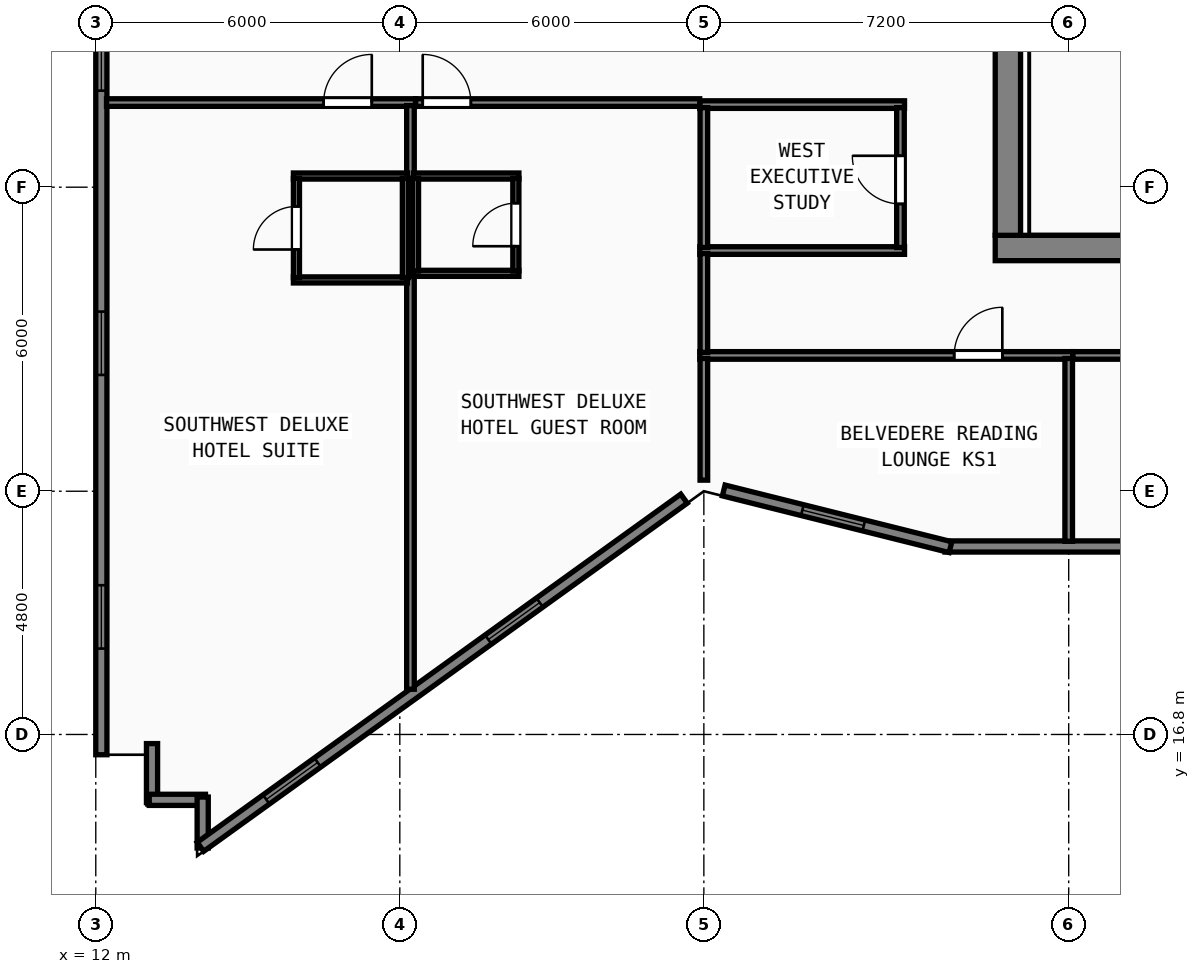
"""IFC4 building model, lengths in metres.
Left out: names, types, materials, properties, quantities, classifications, styles, units other than length and angle.
Written with IfcOpenShell. Run it as: python <this file> out.ifc"""

import sys

from ifc_helpers import new_model, si_unit, direction, frame, frame_2d, origin, origin_2d, place, context, subcontext, project, spatial, rectangle, hollow_rectangle, extrude, element, fill, save


model = new_model("IFC4")
c1 = context("Model", 3, precision=1e-05, world=origin(), true_north=direction((0.0, 1.0)))
c2 = subcontext(c1, "Body", "Model", "MODEL_VIEW")
j1 = project(units=[si_unit("LENGTHUNIT", "METRE"), si_unit("PLANEANGLEUNIT", "RADIAN")], contexts=[c1])
p1 = place(None, origin())
s1 = spatial("IfcSite", under=j1, at=p1, CompositionType="ELEMENT")
p2 = place(p1, origin())
s2 = spatial("IfcBuilding", under=s1, at=p2, CompositionType="ELEMENT")
p3 = place(p2, frame((0.0, 0.0, 235.2)))
s3 = spatial("IfcBuildingStorey", under=s2, at=p3, CompositionType="ELEMENT", Elevation=235.2)
p4 = place(p3, frame((29.75, 26.4, 0.0), z_axis=(0.0, 0.0, 1.0), x_axis=(1.0, 0.0, 0.0)))
e1 = element("IfcWall", 1, at=p4, inside=s3, PredefinedType="SHEAR", context=c2, shape_type="SweptSolid", body=[
    extrude(rectangle(XDim=17.3, YDim=0.5, at=frame_2d((8.65, 0.0))), origin(), (0.0, 0.0, 1.0), 3.67),
])
p5 = place(p4, frame((11.2, 0.0, 0.0), z_axis=(0.0, 0.0, 1.0), x_axis=(-1.0, 0.0, 0.0)))
e2 = element("IfcOpeningElement", 2, at=p5, cuts=e1, PredefinedType="OPENING", context=c2, shape_type="SweptSolid", body=[
    extrude(rectangle(XDim=0.9, YDim=2.1, at=frame_2d((0.45, 1.05))), frame((0.0, 0.26, 0.0), z_axis=(0.0, -1.0, 0.0), x_axis=(1.0, 0.0, 0.0)), (0.0, 0.0, 1.0), 0.52),
])
p6 = place(p3, frame((30.0, 26.65, 0.0), z_axis=(0.0, 0.0, 1.0), x_axis=(0.0, 1.0, 0.0)))
e3 = element("IfcWall", 3, at=p6, inside=s3, PredefinedType="SHEAR", context=c2, shape_type="SweptSolid", body=[
    extrude(rectangle(XDim=4.2, YDim=0.5, at=frame_2d((2.1, 0.0))), origin(), (0.0, 0.0, 1.0), 3.67),
])
for number, where, z_axis, x_axis in (
    (4, (24.0, 21.6, 0.0), (0.0, 0.0, 1.0), (1.0, 0.0, 0.0)),
    (5, (31.2, 21.6, 0.0), (0.0, 0.0, 1.0), (1.0, 0.0, 0.0)),
    (6, (12.6, 16.8, 0.0), (0.0, 0.0, 1.0), (1.0, 0.0, 0.0)),
    (7, (12.6, 27.6, 0.0), (0.0, 0.0, 1.0), (1.0, 0.0, 0.0)),
):
    element("IfcColumn", number, at=place(p3, frame(where, z_axis=z_axis, x_axis=x_axis)), inside=s3, PredefinedType="COLUMN", context=c2, shape_type="SweptSolid", body=[
        extrude(hollow_rectangle(XDim=0.8, YDim=0.8, WallThickness=0.03, at=origin_2d()), origin(), (0.0, 0.0, 1.0), 3.85),
    ])
for number, where, z_axis, x_axis in (
    (8, (24.0, 27.6, 0.0), (0.0, 0.0, 1.0), (1.0, 0.0, 0.0)),
    (9, (18.3, 19.2, 0.0), (0.0, 0.0, 1.0), (1.0, 0.0, 0.0)),
):
    element("IfcColumn", number, at=place(p3, frame(where, z_axis=z_axis, x_axis=x_axis)), inside=s3, PredefinedType="COLUMN", context=c2, shape_type="SweptSolid", body=[
        extrude(hollow_rectangle(XDim=0.7, YDim=0.7, WallThickness=0.026, at=origin_2d()), origin(), (0.0, 0.0, 1.0), 3.85),
    ])
p7 = place(p3, frame((28.759, 20.51, 0.0), z_axis=(0.0, 0.0, 1.0), x_axis=(1.0, 0.0, 0.0)))
e10 = element("IfcWall", 10, at=p7, inside=s3, PredefinedType="SOLIDWALL", context=c2, shape_type="SweptSolid", body=[
    extrude(rectangle(XDim=19.283, YDim=0.22, at=frame_2d((9.642, 0.0))), origin(), (0.0, 0.0, 1.0), 3.67),
])
p8 = place(p7, frame((15.641, 0.0, 0.0), z_axis=(0.0, 0.0, 1.0), x_axis=(-1.0, 0.0, 0.0)))
e11 = element("IfcOpeningElement", 11, at=p8, cuts=e10, PredefinedType="OPENING", context=c2, shape_type="SweptSolid", body=[
    extrude(rectangle(XDim=1.2, YDim=2.15, at=frame_2d((0.6, 1.075))), frame((0.0, 0.12, 0.0), z_axis=(0.0, -1.0, 0.0), x_axis=(1.0, 0.0, 0.0)), (0.0, 0.0, 1.0), 0.24),
])
p9 = place(p3, frame((12.11, 37.545, 0.0), z_axis=(0.0, 0.0, 1.0), x_axis=(0.0, -1.0, 0.0)))
e12 = element("IfcWall", 12, at=p9, inside=s3, PredefinedType="SOLIDWALL", context=c2, shape_type="SweptSolid", body=[
    extrude(rectangle(XDim=21.145, YDim=0.22, at=frame_2d((10.573, 0.0))), origin(), (0.0, 0.0, 1.0), 3.67),
])
p10 = place(p9, frame((1.6, 0.0, 0.85)))
e13 = element("IfcOpeningElement", 13, at=p10, cuts=e12, PredefinedType="OPENING", context=c2, shape_type="SweptSolid", body=[
    extrude(rectangle(XDim=1.25, YDim=1.95, at=frame_2d((0.625, 0.975))), frame((0.0, 0.12, 0.0), z_axis=(0.0, -1.0, 0.0), x_axis=(1.0, 0.0, 0.0)), (0.0, 0.0, 1.0), 0.24),
])
p11 = place(p9, frame((6.79, 0.0, 0.85)))
e14 = element("IfcOpeningElement", 14, at=p11, cuts=e12, PredefinedType="OPENING", context=c2, shape_type="SweptSolid", body=[
    extrude(rectangle(XDim=1.25, YDim=1.95, at=frame_2d((0.625, 0.975))), frame((0.0, 0.12, 0.0), z_axis=(0.0, -1.0, 0.0), x_axis=(1.0, 0.0, 0.0)), (0.0, 0.0, 1.0), 0.24),
])
p12 = place(p9, frame((12.4, 0.0, 0.85)))
e15 = element("IfcOpeningElement", 15, at=p12, cuts=e12, PredefinedType="OPENING", context=c2, shape_type="SweptSolid", body=[
    extrude(rectangle(XDim=1.25, YDim=1.95, at=frame_2d((0.625, 0.975))), frame((0.0, 0.12, 0.0), z_axis=(0.0, -1.0, 0.0), x_axis=(1.0, 0.0, 0.0)), (0.0, 0.0, 1.0), 0.24),
])
p13 = place(p9, frame((17.8, 0.0, 0.85)))
e16 = element("IfcOpeningElement", 16, at=p13, cuts=e12, PredefinedType="OPENING", context=c2, shape_type="SweptSolid", body=[
    extrude(rectangle(XDim=1.25, YDim=1.95, at=frame_2d((0.625, 0.975))), frame((0.0, 0.12, 0.0), z_axis=(0.0, -1.0, 0.0), x_axis=(1.0, 0.0, 0.0)), (0.0, 0.0, 1.0), 0.24),
])
p14 = place(p3, frame((13.11, 16.62, 0.0), z_axis=(0.0, 0.0, 1.0), x_axis=(0.0, -1.0, 0.0)))
e17 = element("IfcWall", 17, at=p14, inside=s3, PredefinedType="SOLIDWALL", context=c2, shape_type="SweptSolid", body=[
    extrude(rectangle(XDim=1.165, YDim=0.22, at=frame_2d((0.583, 0.0))), origin(), (0.0, 0.0, 1.0), 3.67),
])
p15 = place(p3, frame((13.055, 15.51, 0.0), z_axis=(0.0, 0.0, 1.0), x_axis=(1.0, 0.0, 0.0)))
e18 = element("IfcWall", 18, at=p15, inside=s3, PredefinedType="SOLIDWALL", context=c2, shape_type="SweptSolid", body=[
    extrude(rectangle(XDim=1.11, YDim=0.22, at=frame_2d((0.555, 0.0))), origin(), (0.0, 0.0, 1.0), 3.67),
])
p16 = place(p3, frame((14.11, 15.565, 0.0), z_axis=(0.0, 0.0, 1.0), x_axis=(0.0, -1.0, 0.0)))
e19 = element("IfcWall", 19, at=p16, inside=s3, PredefinedType="SOLIDWALL", context=c2, shape_type="SweptSolid", body=[
    extrude(rectangle(XDim=1.005, YDim=0.22, at=frame_2d((0.502, 0.0))), origin(), (0.0, 0.0, 1.0), 3.67),
])
p17 = place(p3, frame((14.065, 14.583, 0.0), z_axis=(0.0, 0.0, 1.0), x_axis=(0.811523708458, 0.584319493608, 0.0)))
e20 = element("IfcWall", 20, at=p17, inside=s3, PredefinedType="SOLIDWALL", context=c2, shape_type="SweptSolid", body=[
    extrude(rectangle(XDim=11.759, YDim=0.22, at=frame_2d((5.879, 0.0))), origin(), (0.0, 0.0, 1.0), 3.315),
])
p18 = place(p17, frame((1.6, 0.0, 0.85)))
e21 = element("IfcOpeningElement", 21, at=p18, cuts=e20, PredefinedType="OPENING", context=c2, shape_type="SweptSolid", body=[
    extrude(rectangle(XDim=1.25, YDim=1.95, at=frame_2d((0.625, 0.975))), frame((0.0, 0.12, 0.0), z_axis=(0.0, -1.0, 0.0), x_axis=(1.0, 0.0, 0.0)), (0.0, 0.0, 1.0), 0.24),
])
p19 = place(p17, frame((7.0, 0.0, 0.85)))
e22 = element("IfcOpeningElement", 22, at=p19, cuts=e20, PredefinedType="OPENING", context=c2, shape_type="SweptSolid", body=[
    extrude(rectangle(XDim=1.25, YDim=1.95, at=frame_2d((0.625, 0.975))), frame((0.0, 0.12, 0.0), z_axis=(0.0, -1.0, 0.0), x_axis=(1.0, 0.0, 0.0)), (0.0, 0.0, 1.0), 0.24),
])
p20 = place(p3, frame((24.392, 21.615, 0.0), z_axis=(0.0, 0.0, 1.0), x_axis=(0.970133159038, -0.242572986408, 0.0)))
e23 = element("IfcWall", 23, at=p20, inside=s3, PredefinedType="SOLIDWALL", context=c2, shape_type="SweptSolid", body=[
    extrude(rectangle(XDim=4.613, YDim=0.22, at=frame_2d((2.306, 0.0))), origin(), (0.0, 0.0, 1.0), 3.315),
])
p21 = place(p20, frame((1.6, 0.0, 0.85)))
e24 = element("IfcOpeningElement", 24, at=p21, cuts=e23, PredefinedType="OPENING", context=c2, shape_type="SweptSolid", body=[
    extrude(rectangle(XDim=1.25, YDim=1.95, at=frame_2d((0.625, 0.975))), frame((0.0, 0.12, 0.0), z_axis=(0.0, -1.0, 0.0), x_axis=(1.0, 0.0, 0.0)), (0.0, 0.0, 1.0), 0.24),
])
for number, where, z_axis, x_axis in (
    (25, (23.92, 29.23, 0.0), (0.0, 0.0, 1.0), (1.0, 0.0, 0.0)),
    (26, (23.92, 26.35, 0.0), (0.0, 0.0, 1.0), (1.0, 0.0, 0.0)),
):
    element("IfcWall", number, at=place(p3, frame(where, z_axis=z_axis, x_axis=x_axis)), inside=s3, PredefinedType="PARTITIONING", context=c2, shape_type="SweptSolid", body=[
        extrude(rectangle(XDim=4.04, YDim=0.15, at=frame_2d((2.02, 0.0))), origin(), (0.0, 0.0, 1.0), 3.67),
    ])
p22 = place(p3, frame((24.0, 26.41, 0.0), z_axis=(0.0, 0.0, 1.0), x_axis=(0.0, 1.0, 0.0)))
e27 = element("IfcWall", 27, at=p22, inside=s3, PredefinedType="PARTITIONING", context=c2, shape_type="SweptSolid", body=[
    extrude(rectangle(XDim=2.76, YDim=0.15, at=frame_2d((1.38, 0.0))), origin(), (0.0, 0.0, 1.0), 3.315),
])
p23 = place(p3, frame((27.88, 26.41, 0.0), z_axis=(0.0, 0.0, 1.0), x_axis=(0.0, 1.0, 0.0)))
e28 = element("IfcWall", 28, at=p23, inside=s3, PredefinedType="PARTITIONING", context=c2, shape_type="SweptSolid", body=[
    extrude(rectangle(XDim=2.76, YDim=0.15, at=frame_2d((1.38, 0.0))), origin(), (0.0, 0.0, 1.0), 3.67),
])
p24 = place(p23, frame((1.81, 0.0, 0.0), z_axis=(0.0, 0.0, 1.0), x_axis=(-1.0, 0.0, 0.0)))
e29 = element("IfcOpeningElement", 29, at=p24, cuts=e28, PredefinedType="OPENING", context=c2, shape_type="SweptSolid", body=[
    extrude(rectangle(XDim=0.95, YDim=2.12, at=frame_2d((0.475, 1.06))), frame((0.0, 0.085, 0.0), z_axis=(0.0, -1.0, 0.0), x_axis=(1.0, 0.0, 0.0)), (0.0, 0.0, 1.0), 0.17),
])
p25 = place(p3, frame((23.92, 24.28, 0.0), z_axis=(0.0, 0.0, 1.0), x_axis=(1.0, 0.0, 0.0)))
e30 = element("IfcWall", 30, at=p25, inside=s3, PredefinedType="PARTITIONING", context=c2, shape_type="SweptSolid", body=[
    extrude(rectangle(XDim=7.36, YDim=0.15, at=frame_2d((3.68, 0.0))), origin(), (0.0, 0.0, 1.0), 3.67),
])
p26 = place(p25, frame((5.97, 0.0, 0.0), z_axis=(0.0, 0.0, 1.0), x_axis=(-1.0, 0.0, 0.0)))
e31 = element("IfcOpeningElement", 31, at=p26, cuts=e30, PredefinedType="OPENING", context=c2, shape_type="SweptSolid", body=[
    extrude(rectangle(XDim=0.95, YDim=2.12, at=frame_2d((0.475, 1.06))), frame((0.0, 0.085, 0.0), z_axis=(0.0, -1.0, 0.0), x_axis=(1.0, 0.0, 0.0)), (0.0, 0.0, 1.0), 0.17),
])
p27 = place(p3, frame((24.0, 21.819, 0.0), z_axis=(0.0, 0.0, 1.0), x_axis=(0.0, 1.0, 0.0)))
e32 = element("IfcWall", 32, at=p27, inside=s3, PredefinedType="PARTITIONING", context=c2, shape_type="SweptSolid", body=[
    extrude(rectangle(XDim=2.401, YDim=0.15, at=frame_2d((1.201, 0.0))), origin(), (0.0, 0.0, 1.0), 3.315),
])
p28 = place(p3, frame((31.2, 20.612, 0.0), z_axis=(0.0, 0.0, 1.0), x_axis=(0.0, 1.0, 0.0)))
e33 = element("IfcWall", 33, at=p28, inside=s3, PredefinedType="PARTITIONING", context=c2, shape_type="SweptSolid", body=[
    extrude(rectangle(XDim=3.608, YDim=0.15, at=frame_2d((1.804, 0.0))), origin(), (0.0, 0.0, 1.0), 3.155),
])
p29 = place(p3, frame((31.282, 24.28, 0.0), z_axis=(0.0, 0.0, 1.0), x_axis=(1.0, 0.0, 0.0)))
e34 = element("IfcWall", 34, at=p29, inside=s3, PredefinedType="PARTITIONING", context=c2, shape_type="SweptSolid", body=[
    extrude(rectangle(XDim=7.198, YDim=0.15, at=frame_2d((3.599, 0.0))), origin(), (0.0, 0.0, 1.0), 3.67),
])
p30 = place(p29, frame((3.913, 0.0, 0.0), z_axis=(0.0, 0.0, 1.0), x_axis=(-1.0, 0.0, 0.0)))
e35 = element("IfcOpeningElement", 35, at=p30, cuts=e34, PredefinedType="OPENING", context=c2, shape_type="SweptSolid", body=[
    extrude(rectangle(XDim=0.95, YDim=2.12, at=frame_2d((0.475, 1.06))), frame((0.0, 0.085, 0.0), z_axis=(0.0, -1.0, 0.0), x_axis=(1.0, 0.0, 0.0)), (0.0, 0.0, 1.0), 0.17),
])
p31 = place(p3, frame((12.212, 29.27, 0.0), z_axis=(0.0, 0.0, 1.0), x_axis=(1.0, 0.0, 0.0)))
e36 = element("IfcWall", 36, at=p31, inside=s3, PredefinedType="PARTITIONING", context=c2, shape_type="SweptSolid", body=[
    extrude(rectangle(XDim=6.098, YDim=0.15, at=frame_2d((3.049, 0.0))), origin(), (0.0, 0.0, 1.0), 3.67),
])
p32 = place(p31, frame((5.235, 0.0, 0.0), z_axis=(0.0, 0.0, 1.0), x_axis=(-1.0, 0.0, 0.0)))
e37 = element("IfcOpeningElement", 37, at=p32, cuts=e36, PredefinedType="OPENING", context=c2, shape_type="SweptSolid", body=[
    extrude(rectangle(XDim=0.95, YDim=2.18, at=frame_2d((0.475, 1.09))), frame((0.0, 0.085, 0.0), z_axis=(0.0, -1.0, 0.0), x_axis=(1.0, 0.0, 0.0)), (0.0, 0.0, 1.0), 0.17),
])
p33 = place(p3, frame((18.21, 17.692, 0.0), z_axis=(0.0, 0.0, 1.0), x_axis=(0.0, 1.0, 0.0)))
e38 = element("IfcWall", 38, at=p33, inside=s3, PredefinedType="PARTITIONING", context=c2, shape_type="SweptSolid", body=[
    extrude(rectangle(XDim=11.518, YDim=0.15, at=frame_2d((5.759, 0.0))), origin(), (0.0, 0.0, 1.0), 3.67),
])
for number, where, z_axis, x_axis in (
    (39, (15.9, 27.82, 0.0), (0.0, 0.0, 1.0), (1.0, 0.0, 0.0)),
    (40, (15.9, 25.77, 0.0), (0.0, 0.0, 1.0), (1.0, 0.0, 0.0)),
):
    element("IfcWall", number, at=place(p3, frame(where, z_axis=z_axis, x_axis=x_axis)), inside=s3, PredefinedType="PARTITIONING", context=c2, shape_type="SweptSolid", body=[
        extrude(rectangle(XDim=2.25, YDim=0.12, at=frame_2d((1.125, 0.0))), origin(), (0.0, 0.0, 1.0), 3.67),
    ])
p34 = place(p3, frame((15.96, 25.815, 0.0), z_axis=(0.0, 0.0, 1.0), x_axis=(0.0, 1.0, 0.0)))
e41 = element("IfcWall", 41, at=p34, inside=s3, PredefinedType="PARTITIONING", context=c2, shape_type="SweptSolid", body=[
    extrude(rectangle(XDim=1.96, YDim=0.12, at=frame_2d((0.98, 0.0))), origin(), (0.0, 0.0, 1.0), 3.67),
])
p35 = place(p34, frame((1.405, 0.0, 0.0), z_axis=(0.0, 0.0, 1.0), x_axis=(-1.0, 0.0, 0.0)))
e42 = element("IfcOpeningElement", 42, at=p35, cuts=e41, PredefinedType="OPENING", context=c2, shape_type="SweptSolid", body=[
    extrude(rectangle(XDim=0.85, YDim=2.1, at=frame_2d((0.425, 1.05))), frame((0.0, 0.07, 0.0), z_axis=(0.0, -1.0, 0.0), x_axis=(1.0, 0.0, 0.0)), (0.0, 0.0, 1.0), 0.14),
])
p36 = place(p3, frame((18.11, 25.815, 0.0), z_axis=(0.0, 0.0, 1.0), x_axis=(0.0, 1.0, 0.0)))
e43 = element("IfcWall", 43, at=p36, inside=s3, PredefinedType="PARTITIONING", context=c2, shape_type="SweptSolid", body=[
    extrude(rectangle(XDim=1.96, YDim=0.12, at=frame_2d((0.98, 0.0))), origin(), (0.0, 0.0, 1.0), 3.67),
])
p37 = place(p3, frame((18.312, 29.27, 0.0), z_axis=(0.0, 0.0, 1.0), x_axis=(1.0, 0.0, 0.0)))
e44 = element("IfcWall", 44, at=p37, inside=s3, PredefinedType="PARTITIONING", context=c2, shape_type="SweptSolid", body=[
    extrude(rectangle(XDim=5.606, YDim=0.15, at=frame_2d((2.803, 0.0))), origin(), (0.0, 0.0, 1.0), 3.67),
])
p38 = place(p37, frame((1.09, 0.0, 0.0), z_axis=(0.0, 0.0, 1.0), x_axis=(-1.0, 0.0, 0.0)))
e45 = element("IfcOpeningElement", 45, at=p38, cuts=e44, PredefinedType="OPENING", context=c2, shape_type="SweptSolid", body=[
    extrude(rectangle(XDim=0.95, YDim=2.15, at=frame_2d((0.475, 1.075))), frame((0.0, 0.085, 0.0), z_axis=(0.0, -1.0, 0.0), x_axis=(1.0, 0.0, 0.0)), (0.0, 0.0, 1.0), 0.17),
])
p39 = place(p3, frame((24.0, 24.34, 0.0), z_axis=(0.0, 0.0, 1.0), x_axis=(0.0, 1.0, 0.0)))
e46 = element("IfcWall", 46, at=p39, inside=s3, PredefinedType="PARTITIONING", context=c2, shape_type="SweptSolid", body=[
    extrude(rectangle(XDim=1.95, YDim=0.15, at=frame_2d((0.975, 0.0))), origin(), (0.0, 0.0, 1.0), 3.315),
])
for number, where, z_axis, x_axis in (
    (47, (18.27, 27.82, 0.0), (0.0, 0.0, 1.0), (1.0, 0.0, 0.0)),
    (48, (18.27, 25.9, 0.0), (0.0, 0.0, 1.0), (1.0, 0.0, 0.0)),
):
    element("IfcWall", number, at=place(p3, frame(where, z_axis=z_axis, x_axis=x_axis)), inside=s3, PredefinedType="PARTITIONING", context=c2, shape_type="SweptSolid", body=[
        extrude(rectangle(XDim=2.08, YDim=0.12, at=frame_2d((1.04, 0.0))), origin(), (0.0, 0.0, 1.0), 3.67),
    ])
p40 = place(p3, frame((18.31, 25.945, 0.0), z_axis=(0.0, 0.0, 1.0), x_axis=(0.0, 1.0, 0.0)))
e49 = element("IfcWall", 49, at=p40, inside=s3, PredefinedType="PARTITIONING", context=c2, shape_type="SweptSolid", body=[
    extrude(rectangle(XDim=1.83, YDim=0.12, at=frame_2d((0.915, 0.0))), origin(), (0.0, 0.0, 1.0), 3.67),
])
p41 = place(p3, frame((20.29, 25.945, 0.0), z_axis=(0.0, 0.0, 1.0), x_axis=(0.0, 1.0, 0.0)))
e50 = element("IfcWall", 50, at=p41, inside=s3, PredefinedType="PARTITIONING", context=c2, shape_type="SweptSolid", body=[
    extrude(rectangle(XDim=1.83, YDim=0.12, at=frame_2d((0.915, 0.0))), origin(), (0.0, 0.0, 1.0), 3.67),
])
p42 = place(p41, frame((0.49, 0.0, 0.0)))
e51 = element("IfcOpeningElement", 51, at=p42, cuts=e50, PredefinedType="OPENING", context=c2, shape_type="SweptSolid", body=[
    extrude(rectangle(XDim=0.85, YDim=2.1, at=frame_2d((0.425, 1.05))), frame((0.0, 0.07, 0.0), z_axis=(0.0, -1.0, 0.0), x_axis=(1.0, 0.0, 0.0)), (0.0, 0.0, 1.0), 0.14),
])
p43 = place(p11, origin())
e52 = element("IfcWindow", 52, at=p43, inside=s3, PartitioningType="SINGLE_PANEL", PredefinedType="WINDOW", context=c2, shape_type="SweptSolid", body=[
    extrude(rectangle(XDim=1.25, YDim=1.95, at=frame_2d((0.625, 0.975))), frame((0.0, 0.03, 0.0), z_axis=(0.0, -1.0, 0.0), x_axis=(1.0, 0.0, 0.0)), (0.0, 0.0, 1.0), 0.06),
])
fill(e14, e52)
p44 = place(p12, origin())
e53 = element("IfcWindow", 53, at=p44, inside=s3, PartitioningType="SINGLE_PANEL", PredefinedType="WINDOW", context=c2, shape_type="SweptSolid", body=[
    extrude(rectangle(XDim=1.25, YDim=1.95, at=frame_2d((0.625, 0.975))), frame((0.0, 0.03, 0.0), z_axis=(0.0, -1.0, 0.0), x_axis=(1.0, 0.0, 0.0)), (0.0, 0.0, 1.0), 0.06),
])
fill(e15, e53)
p45 = place(p13, origin())
e54 = element("IfcWindow", 54, at=p45, inside=s3, PartitioningType="SINGLE_PANEL", PredefinedType="WINDOW", context=c2, shape_type="SweptSolid", body=[
    extrude(rectangle(XDim=1.25, YDim=1.95, at=frame_2d((0.625, 0.975))), frame((0.0, 0.03, 0.0), z_axis=(0.0, -1.0, 0.0), x_axis=(1.0, 0.0, 0.0)), (0.0, 0.0, 1.0), 0.06),
])
fill(e16, e54)
p46 = place(p18, origin())
e55 = element("IfcWindow", 55, at=p46, inside=s3, PartitioningType="SINGLE_PANEL", PredefinedType="WINDOW", context=c2, shape_type="SweptSolid", body=[
    extrude(rectangle(XDim=1.25, YDim=1.95, at=frame_2d((0.625, 0.975))), frame((0.0, 0.03, 0.0), z_axis=(0.0, -1.0, 0.0), x_axis=(1.0, 0.0, 0.0)), (0.0, 0.0, 1.0), 0.06),
])
fill(e21, e55)
p47 = place(p19, origin())
e56 = element("IfcWindow", 56, at=p47, inside=s3, PartitioningType="SINGLE_PANEL", PredefinedType="WINDOW", context=c2, shape_type="SweptSolid", body=[
    extrude(rectangle(XDim=1.25, YDim=1.95, at=frame_2d((0.625, 0.975))), frame((0.0, 0.03, 0.0), z_axis=(0.0, -1.0, 0.0), x_axis=(1.0, 0.0, 0.0)), (0.0, 0.0, 1.0), 0.06),
])
fill(e22, e56)
p48 = place(p21, origin())
e57 = element("IfcWindow", 57, at=p48, inside=s3, PartitioningType="SINGLE_PANEL", PredefinedType="WINDOW", context=c2, shape_type="SweptSolid", body=[
    extrude(rectangle(XDim=1.25, YDim=1.95, at=frame_2d((0.625, 0.975))), frame((0.0, 0.03, 0.0), z_axis=(0.0, -1.0, 0.0), x_axis=(1.0, 0.0, 0.0)), (0.0, 0.0, 1.0), 0.06),
])
fill(e24, e57)
p49 = place(p24, origin())
e58 = element("IfcDoor", 58, at=p49, inside=s3, OperationType="SINGLE_SWING_LEFT", PredefinedType="DOOR", context=c2, shape_type="SweptSolid", body=[
    extrude(rectangle(XDim=0.95, YDim=2.12, at=frame_2d((0.475, 1.06))), frame((0.0, 0.025, 0.0), z_axis=(0.0, -1.0, 0.0), x_axis=(1.0, 0.0, 0.0)), (0.0, 0.0, 1.0), 0.05),
])
fill(e29, e58)
p50 = place(p26, origin())
e59 = element("IfcDoor", 59, at=p50, inside=s3, OperationType="SINGLE_SWING_LEFT", PredefinedType="DOOR", context=c2, shape_type="SweptSolid", body=[
    extrude(rectangle(XDim=0.95, YDim=2.12, at=frame_2d((0.475, 1.06))), frame((0.0, 0.025, 0.0), z_axis=(0.0, -1.0, 0.0), x_axis=(1.0, 0.0, 0.0)), (0.0, 0.0, 1.0), 0.05),
])
fill(e31, e59)
p51 = place(p32, origin())
e60 = element("IfcDoor", 60, at=p51, inside=s3, OperationType="SINGLE_SWING_LEFT", PredefinedType="DOOR", context=c2, shape_type="SweptSolid", body=[
    extrude(rectangle(XDim=0.95, YDim=2.18, at=frame_2d((0.475, 1.09))), frame((0.0, 0.025, 0.0), z_axis=(0.0, -1.0, 0.0), x_axis=(1.0, 0.0, 0.0)), (0.0, 0.0, 1.0), 0.05),
])
fill(e37, e60)
p52 = place(p35, origin())
e61 = element("IfcDoor", 61, at=p52, inside=s3, OperationType="SINGLE_SWING_RIGHT", PredefinedType="DOOR", context=c2, shape_type="SweptSolid", body=[
    extrude(rectangle(XDim=0.85, YDim=2.1, at=frame_2d((0.425, 1.05))), frame((0.0, 0.025, 0.0), z_axis=(0.0, -1.0, 0.0), x_axis=(1.0, 0.0, 0.0)), (0.0, 0.0, 1.0), 0.05),
])
fill(e42, e61)
p53 = place(p38, origin())
e62 = element("IfcDoor", 62, at=p53, inside=s3, OperationType="SINGLE_SWING_RIGHT", PredefinedType="DOOR", context=c2, shape_type="SweptSolid", body=[
    extrude(rectangle(XDim=0.95, YDim=2.15, at=frame_2d((0.475, 1.075))), frame((0.0, 0.025, 0.0), z_axis=(0.0, -1.0, 0.0), x_axis=(1.0, 0.0, 0.0)), (0.0, 0.0, 1.0), 0.05),
])
fill(e45, e62)
p54 = place(p42, origin())
e63 = element("IfcDoor", 63, at=p54, inside=s3, OperationType="SINGLE_SWING_LEFT", PredefinedType="DOOR", context=c2, shape_type="SweptSolid", body=[
    extrude(rectangle(XDim=0.85, YDim=2.1, at=frame_2d((0.425, 1.05))), frame((0.0, 0.025, 0.0), z_axis=(0.0, -1.0, 0.0), x_axis=(1.0, 0.0, 0.0)), (0.0, 0.0, 1.0), 0.05),
])
fill(e51, e63)
save(model, sys.argv[1])
